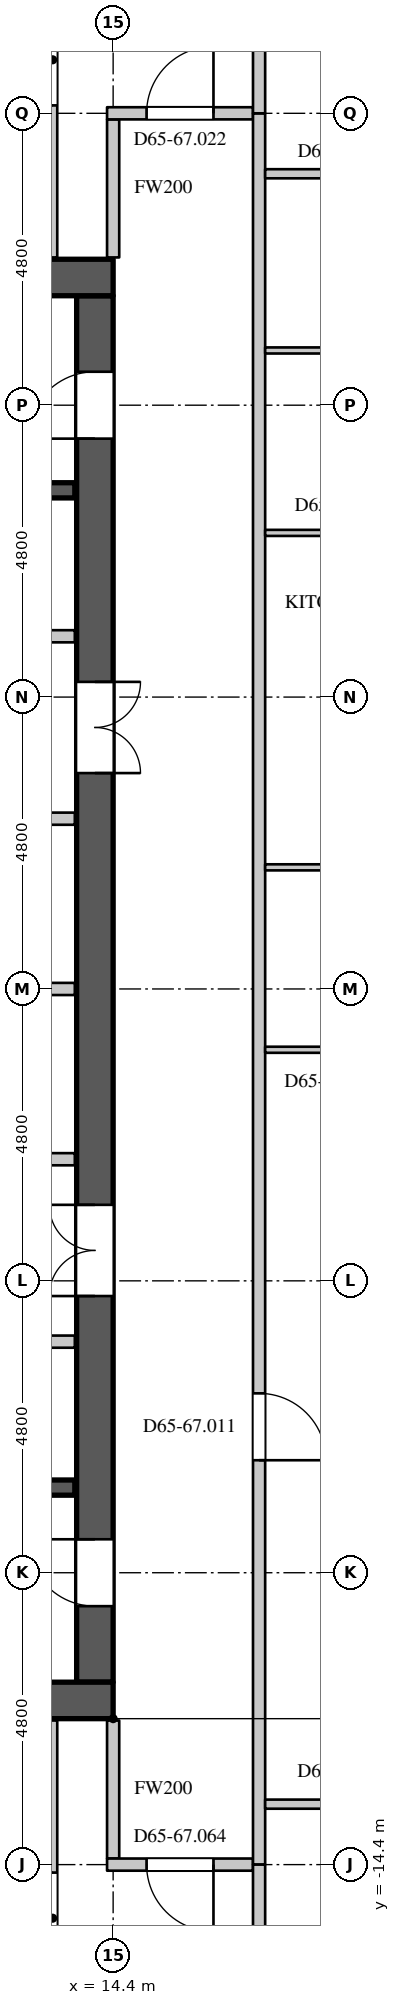
"""IFC4 building model, lengths in metres.
Left out: names, types, materials, properties, quantities, classifications, styles, units other than length and angle.
Written with IfcOpenShell. Run it as: python <this file> out.ifc"""

import sys

from ifc_helpers import new_model, si_unit, direction, frame, frame_2d, origin, place, context, subcontext, project, spatial, rectangle, extrude, element, fill, save


model = new_model("IFC4")
c1 = context("Model", 3, precision=1e-05, world=origin(), true_north=direction((0.0, 1.0)))
c2 = subcontext(c1, "Body", "Model", "MODEL_VIEW")
j1 = project(units=[si_unit("LENGTHUNIT", "METRE"), si_unit("PLANEANGLEUNIT", "RADIAN")], contexts=[c1])
p1 = place(None, origin())
s1 = spatial("IfcSite", under=j1, at=p1, CompositionType="ELEMENT")
p2 = place(p1, origin())
s2 = spatial("IfcBuilding", under=s1, at=p2, CompositionType="ELEMENT")
p3 = place(p2, frame((0.0, 0.0, 281.1)))
s3 = spatial("IfcBuildingStorey", under=s2, at=p3, CompositionType="ELEMENT", Elevation=281.1)
for number, where, z_axis, x_axis in (
    (1, (-14.4, 11.7, 0.0), (0.0, 0.0, 1.0), (1.0, 0.0, 0.0)),
    (2, (-14.4, -11.7, 0.0), (0.0, 0.0, 1.0), (1.0, 0.0, 0.0)),
):
    element("IfcWall", number, at=place(p3, frame(where, z_axis=z_axis, x_axis=x_axis)), inside=s3, PredefinedType="SHEAR", context=c2, shape_type="SweptSolid", body=[
        extrude(rectangle(XDim=28.8, YDim=0.6, at=frame_2d((14.4, 0.0))), origin(), (0.0, 0.0, 1.0), 4.2),
    ])
p4 = place(p3, frame((14.1, -11.4, 0.0), z_axis=(0.0, 0.0, 1.0), x_axis=(0.0, 1.0, 0.0)))
e3 = element("IfcWall", 3, at=p4, inside=s3, PredefinedType="SHEAR", context=c2, shape_type="SweptSolid", body=[
    extrude(rectangle(XDim=22.8, YDim=0.6, at=frame_2d((11.4, 0.0))), origin(), (0.0, 0.0, 1.0), 4.2),
])
p5 = place(p4, frame((20.45, 0.0, 0.0)))
e4 = element("IfcOpeningElement", 4, at=p5, cuts=e3, PredefinedType="OPENING", context=c2, shape_type="SweptSolid", body=[
    extrude(rectangle(XDim=1.1, YDim=2.2, at=frame_2d((0.55, 1.1))), frame((0.0, 0.31, 0.0), z_axis=(0.0, -1.0, 0.0), x_axis=(1.0, 0.0, 0.0)), (0.0, 0.0, 1.0), 0.62),
])
p6 = place(p4, frame((1.25, 0.0, 0.0)))
e5 = element("IfcOpeningElement", 5, at=p6, cuts=e3, PredefinedType="OPENING", context=c2, shape_type="SweptSolid", body=[
    extrude(rectangle(XDim=1.1, YDim=2.2, at=frame_2d((0.55, 1.1))), frame((0.0, 0.31, 0.0), z_axis=(0.0, -1.0, 0.0), x_axis=(1.0, 0.0, 0.0)), (0.0, 0.0, 1.0), 0.62),
])
p7 = place(p4, frame((14.95, 0.0, 0.0)))
e6 = element("IfcOpeningElement", 6, at=p7, cuts=e3, PredefinedType="OPENING", context=c2, shape_type="SweptSolid", body=[
    extrude(rectangle(XDim=1.5, YDim=2.4, at=frame_2d((0.75, 1.2))), frame((0.0, 0.31, 0.0), z_axis=(0.0, -1.0, 0.0), x_axis=(1.0, 0.0, 0.0)), (0.0, 0.0, 1.0), 0.62),
])
p8 = place(p4, frame((6.35, 0.0, 0.0)))
e7 = element("IfcOpeningElement", 7, at=p8, cuts=e3, PredefinedType="OPENING", context=c2, shape_type="SweptSolid", body=[
    extrude(rectangle(XDim=1.5, YDim=2.4, at=frame_2d((0.75, 1.2))), frame((0.0, 0.31, 0.0), z_axis=(0.0, -1.0, 0.0), x_axis=(1.0, 0.0, 0.0)), (0.0, 0.0, 1.0), 0.62),
])
p9 = place(p3, frame((-7.7, -5.8, 0.0), z_axis=(0.0, 0.0, 1.0), x_axis=(1.0, 0.0, 0.0)))
e8 = element("IfcWall", 8, at=p9, inside=s3, PredefinedType="PARTITIONING", context=c2, shape_type="SweptSolid", body=[
    extrude(rectangle(XDim=21.47, YDim=0.2, at=frame_2d((10.735, 0.0))), origin(), (0.0, 0.0, 1.0), 3.95),
])
p10 = place(p9, frame((3.25, 0.0, 0.0)))
e9 = element("IfcOpeningElement", 9, at=p10, cuts=e8, PredefinedType="OPENING", context=c2, shape_type="SweptSolid", body=[
    extrude(rectangle(XDim=0.9, YDim=2.2, at=frame_2d((0.45, 1.1))), frame((0.0, 0.11, 0.0), z_axis=(0.0, -1.0, 0.0), x_axis=(1.0, 0.0, 0.0)), (0.0, 0.0, 1.0), 0.22),
])
p11 = place(p9, frame((11.3, 0.0, 0.0)))
e10 = element("IfcOpeningElement", 10, at=p11, cuts=e8, PredefinedType="OPENING", context=c2, shape_type="SweptSolid", body=[
    extrude(rectangle(XDim=0.9, YDim=2.2, at=frame_2d((0.45, 1.1))), frame((0.0, 0.11, 0.0), z_axis=(0.0, -1.0, 0.0), x_axis=(1.0, 0.0, 0.0)), (0.0, 0.0, 1.0), 0.22),
])
p12 = place(p9, frame((18.35, 0.0, 0.0)))
e11 = element("IfcOpeningElement", 11, at=p12, cuts=e8, PredefinedType="OPENING", context=c2, shape_type="SweptSolid", body=[
    extrude(rectangle(XDim=0.9, YDim=2.2, at=frame_2d((0.45, 1.1))), frame((0.0, 0.11, 0.0), z_axis=(0.0, -1.0, 0.0), x_axis=(1.0, 0.0, 0.0)), (0.0, 0.0, 1.0), 0.22),
])
p13 = place(p3, frame((4.82, 5.8, 0.0), z_axis=(0.0, 0.0, 1.0), x_axis=(1.0, 0.0, 0.0)))
e12 = element("IfcWall", 12, at=p13, inside=s3, PredefinedType="PARTITIONING", context=c2, shape_type="SweptSolid", body=[
    extrude(rectangle(XDim=8.95, YDim=0.2, at=frame_2d((4.475, 0.0))), origin(), (0.0, 0.0, 1.0), 3.95),
])
p14 = place(p13, frame((1.5, 0.0, 0.0)))
e13 = element("IfcOpeningElement", 13, at=p14, cuts=e12, PredefinedType="OPENING", context=c2, shape_type="SweptSolid", body=[
    extrude(rectangle(XDim=0.9, YDim=2.2, at=frame_2d((0.45, 1.1))), frame((0.0, 0.11, 0.0), z_axis=(0.0, -1.0, 0.0), x_axis=(1.0, 0.0, 0.0)), (0.0, 0.0, 1.0), 0.22),
])
p15 = place(p13, frame((5.85, 0.0, 0.0)))
e14 = element("IfcOpeningElement", 14, at=p15, cuts=e12, PredefinedType="OPENING", context=c2, shape_type="SweptSolid", body=[
    extrude(rectangle(XDim=0.9, YDim=2.2, at=frame_2d((0.45, 1.1))), frame((0.0, 0.11, 0.0), z_axis=(0.0, -1.0, 0.0), x_axis=(1.0, 0.0, 0.0)), (0.0, 0.0, 1.0), 0.22),
])
p16 = place(p3, frame((14.4, -14.3, 0.0), z_axis=(0.0, 0.0, 1.0), x_axis=(0.0, 1.0, 0.0)))
e15 = element("IfcWall", 15, at=p16, inside=s3, PredefinedType="PARTITIONING", context=c2, shape_type="SweptSolid", body=[
    extrude(rectangle(XDim=2.27, YDim=0.2, at=frame_2d((1.135, 0.0))), origin(), (0.0, 0.0, 1.0), 3.95),
])
p17 = place(p3, frame((14.3, -14.4, 0.0), z_axis=(0.0, 0.0, 1.0), x_axis=(1.0, 0.0, 0.0)))
e16 = element("IfcWall", 16, at=p17, inside=s3, PredefinedType="PARTITIONING", context=c2, shape_type="SweptSolid", body=[
    extrude(rectangle(XDim=2.4, YDim=0.2, at=frame_2d((1.2, 0.0))), origin(), (0.0, 0.0, 1.0), 3.95),
])
p18 = place(p17, frame((0.65, 0.0, 0.0)))
e17 = element("IfcOpeningElement", 17, at=p18, cuts=e16, PredefinedType="OPENING", context=c2, shape_type="SweptSolid", body=[
    extrude(rectangle(XDim=1.1, YDim=2.4, at=frame_2d((0.55, 1.2))), frame((0.0, 0.11, 0.0), z_axis=(0.0, -1.0, 0.0), x_axis=(1.0, 0.0, 0.0)), (0.0, 0.0, 1.0), 0.22),
])
p19 = place(p3, frame((14.4, 12.03, 0.0), z_axis=(0.0, 0.0, 1.0), x_axis=(0.0, 1.0, 0.0)))
e18 = element("IfcWall", 18, at=p19, inside=s3, PredefinedType="PARTITIONING", context=c2, shape_type="SweptSolid", body=[
    extrude(rectangle(XDim=2.27, YDim=0.2, at=frame_2d((1.135, 0.0))), origin(), (0.0, 0.0, 1.0), 3.95),
])
p20 = place(p3, frame((14.3, 14.4, 0.0), z_axis=(0.0, 0.0, 1.0), x_axis=(1.0, 0.0, 0.0)))
e19 = element("IfcWall", 19, at=p20, inside=s3, PredefinedType="PARTITIONING", context=c2, shape_type="SweptSolid", body=[
    extrude(rectangle(XDim=2.4, YDim=0.2, at=frame_2d((1.2, 0.0))), origin(), (0.0, 0.0, 1.0), 3.95),
])
p21 = place(p20, frame((0.65, 0.0, 0.0)))
e20 = element("IfcOpeningElement", 20, at=p21, cuts=e19, PredefinedType="OPENING", context=c2, shape_type="SweptSolid", body=[
    extrude(rectangle(XDim=1.1, YDim=2.4, at=frame_2d((0.55, 1.2))), frame((0.0, 0.11, 0.0), z_axis=(0.0, -1.0, 0.0), x_axis=(1.0, 0.0, 0.0)), (0.0, 0.0, 1.0), 0.22),
])
p22 = place(p3, frame((16.8, -14.4, 0.0), z_axis=(0.0, 0.0, 1.0), x_axis=(0.0, 1.0, 0.0)))
e21 = element("IfcWall", 21, at=p22, inside=s3, PredefinedType="PARTITIONING", context=c2, shape_type="SweptSolid", body=[
    extrude(rectangle(XDim=28.8, YDim=0.2, at=frame_2d((14.4, 0.0))), origin(), (0.0, 0.0, 1.0), 3.95),
])
p23 = place(p22, frame((6.65, 0.0, 0.0)))
e22 = element("IfcOpeningElement", 22, at=p23, cuts=e21, PredefinedType="OPENING", context=c2, shape_type="SweptSolid", body=[
    extrude(rectangle(XDim=1.1, YDim=2.4, at=frame_2d((0.55, 1.2))), frame((0.0, 0.11, 0.0), z_axis=(0.0, -1.0, 0.0), x_axis=(1.0, 0.0, 0.0)), (0.0, 0.0, 1.0), 0.22),
])
p24 = place(p3, frame((13.406, -25.731, 0.0), z_axis=(0.0, 0.0, 1.0), x_axis=(0.0, 1.0, 0.0)))
e23 = element("IfcWall", 23, at=p24, inside=s3, PredefinedType="PARTITIONING", context=c2, shape_type="SweptSolid", body=[
    extrude(rectangle(XDim=13.701, YDim=0.15, at=frame_2d((6.851, 0.0))), origin(), (0.0, 0.0, 1.0), 3.3),
])
p25 = place(p24, frame((9.7, 0.0, 0.0)))
e24 = element("IfcOpeningElement", 24, at=p25, cuts=e23, PredefinedType="OPENING", context=c2, shape_type="SweptSolid", body=[
    extrude(rectangle(XDim=1.5, YDim=2.2, at=frame_2d((0.75, 1.1))), frame((0.0, 0.085, 0.0), z_axis=(0.0, -1.0, 0.0), x_axis=(1.0, 0.0, 0.0)), (0.0, 0.0, 1.0), 0.17),
])
p26 = place(p3, frame((13.406, 12.03, 0.0), z_axis=(0.0, 0.0, 1.0), x_axis=(0.0, 1.0, 0.0)))
e25 = element("IfcWall", 25, at=p26, inside=s3, PredefinedType="PARTITIONING", context=c2, shape_type="SweptSolid", body=[
    extrude(rectangle(XDim=13.701, YDim=0.15, at=frame_2d((6.851, 0.0))), origin(), (0.0, 0.0, 1.0), 3.3),
])
p27 = place(p26, frame((2.5, 0.0, 0.0)))
e26 = element("IfcOpeningElement", 26, at=p27, cuts=e25, PredefinedType="OPENING", context=c2, shape_type="SweptSolid", body=[
    extrude(rectangle(XDim=1.5, YDim=2.2, at=frame_2d((0.75, 1.1))), frame((0.0, 0.085, 0.0), z_axis=(0.0, -1.0, 0.0), x_axis=(1.0, 0.0, 0.0)), (0.0, 0.0, 1.0), 0.17),
])
p28 = place(p3, frame((16.9, -13.406, 0.0), z_axis=(0.0, 0.0, 1.0), x_axis=(1.0, 0.0, 0.0)))
e27 = element("IfcWall", 27, at=p28, inside=s3, PredefinedType="PARTITIONING", context=c2, shape_type="SweptSolid", body=[
    extrude(rectangle(XDim=8.324, YDim=0.15, at=frame_2d((4.162, 0.0))), origin(), (0.0, 0.0, 1.0), 3.95),
])
p29 = place(p28, frame((1.35, 0.0, 0.0)))
e28 = element("IfcOpeningElement", 28, at=p29, cuts=e27, PredefinedType="OPENING", context=c2, shape_type="SweptSolid", body=[
    extrude(rectangle(XDim=0.95, YDim=2.2, at=frame_2d((0.475, 1.1))), frame((0.0, 0.085, 0.0), z_axis=(0.0, -1.0, 0.0), x_axis=(1.0, 0.0, 0.0)), (0.0, 0.0, 1.0), 0.17),
])
p30 = place(p3, frame((16.9, 13.406, 0.0), z_axis=(0.0, 0.0, 1.0), x_axis=(1.0, 0.0, 0.0)))
e29 = element("IfcWall", 29, at=p30, inside=s3, PredefinedType="PARTITIONING", context=c2, shape_type="SweptSolid", body=[
    extrude(rectangle(XDim=8.324, YDim=0.15, at=frame_2d((4.162, 0.0))), origin(), (0.0, 0.0, 1.0), 3.95),
])
p31 = place(p30, frame((5.15, 0.0, 0.0)))
e30 = element("IfcOpeningElement", 30, at=p31, cuts=e29, PredefinedType="OPENING", context=c2, shape_type="SweptSolid", body=[
    extrude(rectangle(XDim=1.5, YDim=2.2, at=frame_2d((0.75, 1.1))), frame((0.0, 0.085, 0.0), z_axis=(0.0, -1.0, 0.0), x_axis=(1.0, 0.0, 0.0)), (0.0, 0.0, 1.0), 0.17),
])
p32 = place(p30, frame((1.2, 0.0, 0.0)))
e31 = element("IfcOpeningElement", 31, at=p32, cuts=e29, PredefinedType="OPENING", context=c2, shape_type="SweptSolid", body=[
    extrude(rectangle(XDim=0.9, YDim=2.2, at=frame_2d((0.45, 1.1))), frame((0.0, 0.085, 0.0), z_axis=(0.0, -1.0, 0.0), x_axis=(1.0, 0.0, 0.0)), (0.0, 0.0, 1.0), 0.17),
])
for number, where, z_axis, x_axis in (
    (32, (16.8, -19.803, 0.0), (0.0, 0.0, 1.0), (0.0, 1.0, 0.0)),
    (33, (16.8, 14.4, 0.0), (0.0, 0.0, 1.0), (0.0, 1.0, 0.0)),
):
    element("IfcWall", number, at=place(p3, frame(where, z_axis=z_axis, x_axis=x_axis)), inside=s3, PredefinedType="PARTITIONING", context=c2, shape_type="SweptSolid", body=[
        extrude(rectangle(XDim=5.403, YDim=0.2, at=frame_2d((2.702, 0.0))), origin(), (0.0, 0.0, 1.0), 3.95),
    ])
p33 = place(p3, frame((7.8, -2.8, 0.0), z_axis=(0.0, 0.0, 1.0), x_axis=(1.0, 0.0, 0.0)))
e34 = element("IfcWall", 34, at=p33, inside=s3, PredefinedType="PARTITIONING", context=c2, shape_type="SweptSolid", body=[
    extrude(rectangle(XDim=5.97, YDim=0.2, at=frame_2d((2.985, 0.0))), origin(), (0.0, 0.0, 1.0), 3.95),
])
p34 = place(p33, frame((2.55, 0.0, 0.0)))
e35 = element("IfcOpeningElement", 35, at=p34, cuts=e34, PredefinedType="OPENING", context=c2, shape_type="SweptSolid", body=[
    extrude(rectangle(XDim=0.9, YDim=2.2, at=frame_2d((0.45, 1.1))), frame((0.0, 0.11, 0.0), z_axis=(0.0, -1.0, 0.0), x_axis=(1.0, 0.0, 0.0)), (0.0, 0.0, 1.0), 0.22),
])
p35 = place(p3, frame((7.8, 0.0, 0.0), z_axis=(0.0, 0.0, 1.0), x_axis=(1.0, 0.0, 0.0)))
e36 = element("IfcWall", 36, at=p35, inside=s3, PredefinedType="PARTITIONING", context=c2, shape_type="SweptSolid", body=[
    extrude(rectangle(XDim=5.97, YDim=0.2, at=frame_2d((2.985, 0.0))), origin(), (0.0, 0.0, 1.0), 3.95),
])
p36 = place(p3, frame((10.42, 2.8, 0.0), z_axis=(0.0, 0.0, 1.0), x_axis=(1.0, 0.0, 0.0)))
e37 = element("IfcWall", 37, at=p36, inside=s3, PredefinedType="PARTITIONING", context=c2, shape_type="SweptSolid", body=[
    extrude(rectangle(XDim=3.35, YDim=0.2, at=frame_2d((1.675, 0.0))), origin(), (0.0, 0.0, 1.0), 3.95),
])
p37 = place(p36, frame((1.35, 0.0, 0.0)))
e38 = element("IfcOpeningElement", 38, at=p37, cuts=e37, PredefinedType="OPENING", context=c2, shape_type="SweptSolid", body=[
    extrude(rectangle(XDim=0.6, YDim=2.0, at=frame_2d((0.3, 1.0))), frame((0.0, 0.11, 0.0), z_axis=(0.0, -1.0, 0.0), x_axis=(1.0, 0.0, 0.0)), (0.0, 0.0, 1.0), 0.22),
])
for number, where, z_axis, x_axis in (
    (39, (5.275, -8.2, 0.0), (0.0, 0.0, 1.0), (1.0, 0.0, 0.0)),
    (40, (5.275, 8.2, 0.0), (0.0, 0.0, 1.0), (1.0, 0.0, 0.0)),
):
    element("IfcWall", number, at=place(p3, frame(where, z_axis=z_axis, x_axis=x_axis)), inside=s3, PredefinedType="SHEAR", context=c2, shape_type="SweptSolid", body=[
        extrude(rectangle(XDim=8.495, YDim=0.25, at=frame_2d((4.248, 0.0))), origin(), (0.0, 0.0, 1.0), 3.95),
    ])
p38 = place(p3, frame((16.9, -1.0, 0.0), z_axis=(0.0, 0.0, 1.0), x_axis=(1.0, 0.0, 0.0)))
e41 = element("IfcWall", 41, at=p38, inside=s3, PredefinedType="PARTITIONING", context=c2, shape_type="SweptSolid", body=[
    extrude(rectangle(XDim=4.05, YDim=0.1, at=frame_2d((2.025, 0.0))), origin(), (0.0, 0.0, 1.0), 3.95),
])
p39 = place(p38, frame((1.55, 0.0, 0.0)))
e42 = element("IfcOpeningElement", 42, at=p39, cuts=e41, PredefinedType="OPENING", context=c2, shape_type="SweptSolid", body=[
    extrude(rectangle(XDim=0.9, YDim=2.2, at=frame_2d((0.45, 1.1))), frame((0.0, 0.06, 0.0), z_axis=(0.0, -1.0, 0.0), x_axis=(1.0, 0.0, 0.0)), (0.0, 0.0, 1.0), 0.12),
])
p40 = place(p3, frame((16.9, 2.0, 0.0), z_axis=(0.0, 0.0, 1.0), x_axis=(1.0, 0.0, 0.0)))
e43 = element("IfcWall", 43, at=p40, inside=s3, PredefinedType="PARTITIONING", context=c2, shape_type="SweptSolid", body=[
    extrude(rectangle(XDim=4.025, YDim=0.1, at=frame_2d((2.013, 0.0))), origin(), (0.0, 0.0, 1.0), 3.95),
])
p41 = place(p3, frame((16.9, 7.5, 0.0), z_axis=(0.0, 0.0, 1.0), x_axis=(1.0, 0.0, 0.0)))
e44 = element("IfcWall", 44, at=p41, inside=s3, PredefinedType="PARTITIONING", context=c2, shape_type="SweptSolid", body=[
    extrude(rectangle(XDim=3.075, YDim=0.1, at=frame_2d((1.538, 0.0))), origin(), (0.0, 0.0, 1.0), 3.95),
])
p42 = place(p41, frame((1.05, 0.0, 0.0)))
e45 = element("IfcOpeningElement", 45, at=p42, cuts=e44, PredefinedType="OPENING", context=c2, shape_type="SweptSolid", body=[
    extrude(rectangle(XDim=0.9, YDim=2.2, at=frame_2d((0.45, 1.1))), frame((0.0, 0.06, 0.0), z_axis=(0.0, -1.0, 0.0), x_axis=(1.0, 0.0, 0.0)), (0.0, 0.0, 1.0), 0.12),
])
p43 = place(p3, frame((16.9, 10.5, 0.0), z_axis=(0.0, 0.0, 1.0), x_axis=(1.0, 0.0, 0.0)))
e46 = element("IfcWall", 46, at=p43, inside=s3, PredefinedType="PARTITIONING", context=c2, shape_type="SweptSolid", body=[
    extrude(rectangle(XDim=3.075, YDim=0.1, at=frame_2d((1.538, 0.0))), origin(), (0.0, 0.0, 1.0), 3.95),
])
p44 = place(p5, origin())
e47 = element("IfcDoor", 47, at=p44, inside=s3, OperationType="SINGLE_SWING_LEFT", PredefinedType="DOOR", context=c2, shape_type="SweptSolid", body=[
    extrude(rectangle(XDim=1.1, YDim=2.2, at=frame_2d((0.55, 1.1))), frame((0.0, 0.295, 0.0), z_axis=(0.0, -1.0, 0.0), x_axis=(1.0, 0.0, 0.0)), (0.0, 0.0, 1.0), 0.05),
])
fill(e4, e47)
p45 = place(p6, origin())
e48 = element("IfcDoor", 48, at=p45, inside=s3, OperationType="SINGLE_SWING_RIGHT", PredefinedType="DOOR", context=c2, shape_type="SweptSolid", body=[
    extrude(rectangle(XDim=1.1, YDim=2.2, at=frame_2d((0.55, 1.1))), frame((0.0, 0.295, 0.0), z_axis=(0.0, -1.0, 0.0), x_axis=(1.0, 0.0, 0.0)), (0.0, 0.0, 1.0), 0.05),
])
fill(e5, e48)
p46 = place(p7, origin())
e49 = element("IfcDoor", 49, at=p46, inside=s3, OperationType="DOUBLE_DOOR_SINGLE_SWING", PredefinedType="DOOR", context=c2, shape_type="SweptSolid", body=[
    extrude(rectangle(XDim=1.5, YDim=2.4, at=frame_2d((0.75, 1.2))), frame((0.0, -0.245, 0.0), z_axis=(0.0, -1.0, 0.0), x_axis=(1.0, 0.0, 0.0)), (0.0, 0.0, 1.0), 0.05),
])
fill(e6, e49)
p47 = place(p8, origin())
e50 = element("IfcDoor", 50, at=p47, inside=s3, OperationType="DOUBLE_DOOR_SINGLE_SWING", PredefinedType="DOOR", context=c2, shape_type="SweptSolid", body=[
    extrude(rectangle(XDim=1.5, YDim=2.4, at=frame_2d((0.75, 1.2))), frame((0.0, 0.295, 0.0), z_axis=(0.0, -1.0, 0.0), x_axis=(1.0, 0.0, 0.0)), (0.0, 0.0, 1.0), 0.05),
])
fill(e7, e50)
p48 = place(p23, origin())
e51 = element("IfcDoor", 51, at=p48, inside=s3, OperationType="SINGLE_SWING_RIGHT", PredefinedType="DOOR", context=c2, shape_type="SweptSolid", body=[
    extrude(rectangle(XDim=1.1, YDim=2.4, at=frame_2d((0.55, 1.2))), frame((0.0, 0.025, 0.0), z_axis=(0.0, -1.0, 0.0), x_axis=(1.0, 0.0, 0.0)), (0.0, 0.0, 1.0), 0.05),
])
fill(e22, e51)
p49 = place(p21, origin())
e52 = element("IfcDoor", 52, at=p49, inside=s3, OperationType="SINGLE_SWING_RIGHT", PredefinedType="DOOR", context=c2, shape_type="SweptSolid", body=[
    extrude(rectangle(XDim=1.1, YDim=2.4, at=frame_2d((0.55, 1.2))), frame((0.0, 0.025, 0.0), z_axis=(0.0, -1.0, 0.0), x_axis=(1.0, 0.0, 0.0)), (0.0, 0.0, 1.0), 0.05),
])
fill(e20, e52)
p50 = place(p27, origin())
e53 = element("IfcDoor", 53, at=p50, inside=s3, OperationType="DOUBLE_DOOR_SINGLE_SWING", PredefinedType="DOOR", context=c2, shape_type="SweptSolid", body=[
    extrude(rectangle(XDim=1.5, YDim=2.2, at=frame_2d((0.75, 1.1))), frame((0.0, 0.025, 0.0), z_axis=(0.0, -1.0, 0.0), x_axis=(1.0, 0.0, 0.0)), (0.0, 0.0, 1.0), 0.05),
])
fill(e26, e53)
p51 = place(p18, origin())
e54 = element("IfcDoor", 54, at=p51, inside=s3, OperationType="SINGLE_SWING_LEFT", PredefinedType="DOOR", context=c2, shape_type="SweptSolid", body=[
    extrude(rectangle(XDim=1.1, YDim=2.4, at=frame_2d((0.55, 1.2))), frame((0.0, 0.025, 0.0), z_axis=(0.0, -1.0, 0.0), x_axis=(1.0, 0.0, 0.0)), (0.0, 0.0, 1.0), 0.05),
])
fill(e17, e54)
p52 = place(p25, origin())
e55 = element("IfcDoor", 55, at=p52, inside=s3, OperationType="DOUBLE_DOOR_SINGLE_SWING", PredefinedType="DOOR", context=c2, shape_type="SweptSolid", body=[
    extrude(rectangle(XDim=1.5, YDim=2.2, at=frame_2d((0.75, 1.1))), frame((0.0, 0.025, 0.0), z_axis=(0.0, -1.0, 0.0), x_axis=(1.0, 0.0, 0.0)), (0.0, 0.0, 1.0), 0.05),
])
fill(e24, e55)
save(model, sys.argv[1])
